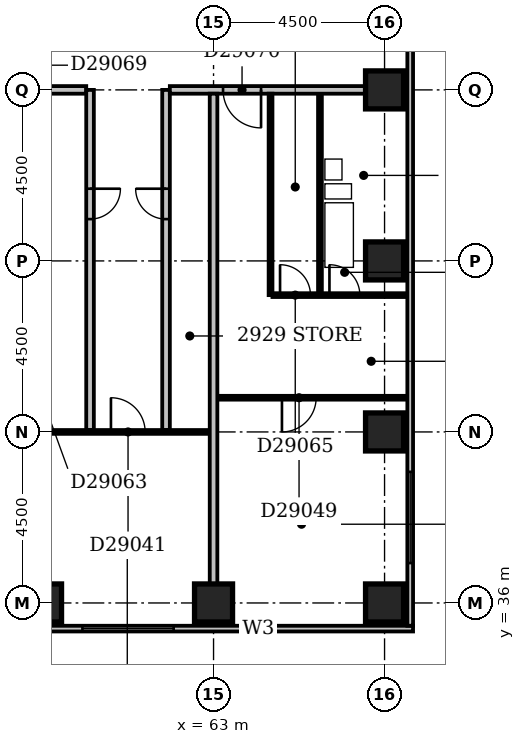
"""IFC4 building model, lengths in metres.
Left out: names, types, materials, properties, quantities, classifications, styles, units other than length and angle.
Written with IfcOpenShell. Run it as: python <this file> out.ifc"""

import sys

from ifc_helpers import new_model, si_unit, direction, frame, frame_2d, origin, origin_2d, place, context, subcontext, project, spatial, rectangle, extrude, element, fill, save


model = new_model("IFC4")
c1 = context("Model", 3, precision=1e-05, world=origin(), true_north=direction((0.0, 1.0)))
c2 = subcontext(c1, "Body", "Model", "MODEL_VIEW")
j1 = project(units=[si_unit("LENGTHUNIT", "METRE"), si_unit("PLANEANGLEUNIT", "RADIAN")], contexts=[c1])
p1 = place(None, origin())
s1 = spatial("IfcSite", under=j1, at=p1, CompositionType="ELEMENT")
p2 = place(p1, origin())
s2 = spatial("IfcBuilding", under=s1, at=p2, CompositionType="ELEMENT")
p3 = place(p2, frame((0.0, 0.0, 119.6)))
s3 = spatial("IfcBuildingStorey", under=s2, at=p3, CompositionType="ELEMENT", Elevation=119.6)
for number, where, z_axis, x_axis in (
    (1, (58.5, 36.0, -0.3), (0.0, 0.0, 1.0), (1.0, 0.0, 0.0)),
    (2, (63.0, 36.0, -0.3), (0.0, 0.0, 1.0), (1.0, 0.0, 0.0)),
    (3, (67.5, 36.0, -0.3), (0.0, 0.0, 1.0), (1.0, 0.0, 0.0)),
    (4, (67.5, 40.5, -0.3), (0.0, 0.0, 1.0), (1.0, 0.0, 0.0)),
    (5, (67.5, 45.0, -0.3), (0.0, 0.0, 1.0), (1.0, 0.0, 0.0)),
    (6, (67.5, 49.5, -0.3), (0.0, 0.0, 1.0), (1.0, 0.0, 0.0)),
):
    element("IfcColumn", number, at=place(p3, frame(where, z_axis=z_axis, x_axis=x_axis)), inside=s3, PredefinedType="COLUMN", context=c2, shape_type="SweptSolid", body=[
        extrude(rectangle(XDim=1.0, YDim=1.0, at=origin_2d()), origin(), (0.0, 0.0, 1.0), 3.6),
    ])
p4 = place(p3, frame((23.1, 35.325, 0.0), z_axis=(0.0, 0.0, 1.0), x_axis=(1.0, 0.0, 0.0)))
e7 = element("IfcWall", 7, at=p4, inside=s3, PredefinedType="STANDARD", context=c2, shape_type="SweptSolid", body=[
    extrude(rectangle(XDim=45.15, YDim=0.15, at=frame_2d((22.575, 0.0))), origin(), (0.0, 0.0, 1.0), 2.7),
])
p5 = place(p4, frame((0.45, 0.0, 0.6)))
e8 = element("IfcOpeningElement", 8, at=p5, cuts=e7, PredefinedType="OPENING", context=c2, shape_type="SweptSolid", body=[
    extrude(rectangle(XDim=2.4, YDim=1.8, at=frame_2d((1.2, 0.9))), frame((0.0, 0.087, 0.0), z_axis=(0.0, -1.0, 0.0), x_axis=(1.0, 0.0, 0.0)), (0.0, 0.0, 1.0), 0.174),
])
p6 = place(p4, frame((4.95, 0.0, 0.6)))
e9 = element("IfcOpeningElement", 9, at=p6, cuts=e7, PredefinedType="OPENING", context=c2, shape_type="SweptSolid", body=[
    extrude(rectangle(XDim=2.4, YDim=1.8, at=frame_2d((1.2, 0.9))), frame((0.0, 0.087, 0.0), z_axis=(0.0, -1.0, 0.0), x_axis=(1.0, 0.0, 0.0)), (0.0, 0.0, 1.0), 0.174),
])
p7 = place(p4, frame((9.225, 0.0, 0.6)))
e10 = element("IfcOpeningElement", 10, at=p7, cuts=e7, PredefinedType="OPENING", context=c2, shape_type="SweptSolid", body=[
    extrude(rectangle(XDim=1.5, YDim=1.8, at=frame_2d((0.75, 0.9))), frame((0.0, 0.087, 0.0), z_axis=(0.0, -1.0, 0.0), x_axis=(1.0, 0.0, 0.0)), (0.0, 0.0, 1.0), 0.174),
])
p8 = place(p4, frame((15.146, 0.0, 0.6)))
e11 = element("IfcOpeningElement", 11, at=p8, cuts=e7, PredefinedType="OPENING", context=c2, shape_type="SweptSolid", body=[
    extrude(rectangle(XDim=1.5, YDim=1.8, at=frame_2d((0.75, 0.9))), frame((0.0, 0.087, 0.0), z_axis=(0.0, -1.0, 0.0), x_axis=(1.0, 0.0, 0.0)), (0.0, 0.0, 1.0), 0.174),
])
p9 = place(p4, frame((18.45, 0.0, 0.6)))
e12 = element("IfcOpeningElement", 12, at=p9, cuts=e7, PredefinedType="OPENING", context=c2, shape_type="SweptSolid", body=[
    extrude(rectangle(XDim=2.4, YDim=1.8, at=frame_2d((1.2, 0.9))), frame((0.0, 0.087, 0.0), z_axis=(0.0, -1.0, 0.0), x_axis=(1.0, 0.0, 0.0)), (0.0, 0.0, 1.0), 0.174),
])
p10 = place(p4, frame((22.95, 0.0, 0.6)))
e13 = element("IfcOpeningElement", 13, at=p10, cuts=e7, PredefinedType="OPENING", context=c2, shape_type="SweptSolid", body=[
    extrude(rectangle(XDim=2.4, YDim=1.8, at=frame_2d((1.2, 0.9))), frame((0.0, 0.087, 0.0), z_axis=(0.0, -1.0, 0.0), x_axis=(1.0, 0.0, 0.0)), (0.0, 0.0, 1.0), 0.174),
])
p11 = place(p4, frame((27.45, 0.0, 0.6)))
e14 = element("IfcOpeningElement", 14, at=p11, cuts=e7, PredefinedType="OPENING", context=c2, shape_type="SweptSolid", body=[
    extrude(rectangle(XDim=2.4, YDim=1.8, at=frame_2d((1.2, 0.9))), frame((0.0, 0.087, 0.0), z_axis=(0.0, -1.0, 0.0), x_axis=(1.0, 0.0, 0.0)), (0.0, 0.0, 1.0), 0.174),
])
p12 = place(p4, frame((31.95, 0.0, 0.6)))
e15 = element("IfcOpeningElement", 15, at=p12, cuts=e7, PredefinedType="OPENING", context=c2, shape_type="SweptSolid", body=[
    extrude(rectangle(XDim=2.4, YDim=1.8, at=frame_2d((1.2, 0.9))), frame((0.0, 0.087, 0.0), z_axis=(0.0, -1.0, 0.0), x_axis=(1.0, 0.0, 0.0)), (0.0, 0.0, 1.0), 0.174),
])
p13 = place(p4, frame((36.45, 0.0, 0.6)))
e16 = element("IfcOpeningElement", 16, at=p13, cuts=e7, PredefinedType="OPENING", context=c2, shape_type="SweptSolid", body=[
    extrude(rectangle(XDim=2.4, YDim=1.8, at=frame_2d((1.2, 0.9))), frame((0.0, 0.087, 0.0), z_axis=(0.0, -1.0, 0.0), x_axis=(1.0, 0.0, 0.0)), (0.0, 0.0, 1.0), 0.174),
])
p14 = place(p4, frame((40.631, 0.0, 0.6)))
e17 = element("IfcOpeningElement", 17, at=p14, cuts=e7, PredefinedType="OPENING", context=c2, shape_type="SweptSolid", body=[
    extrude(rectangle(XDim=0.9, YDim=1.8, at=frame_2d((0.45, 0.9))), frame((0.0, 0.087, 0.0), z_axis=(0.0, -1.0, 0.0), x_axis=(1.0, 0.0, 0.0)), (0.0, 0.0, 1.0), 0.174),
])
p15 = place(p3, frame((68.175, 35.4, 0.0), z_axis=(0.0, 0.0, 1.0), x_axis=(0.0, 1.0, 0.0)))
e18 = element("IfcWall", 18, at=p15, inside=s3, PredefinedType="STANDARD", context=c2, shape_type="SweptSolid", body=[
    extrude(rectangle(XDim=23.85, YDim=0.15, at=frame_2d((11.925, 0.0))), origin(), (0.0, 0.0, 1.0), 2.7),
])
p16 = place(p15, frame((1.65, 0.0, 0.6)))
e19 = element("IfcOpeningElement", 19, at=p16, cuts=e18, PredefinedType="OPENING", context=c2, shape_type="SweptSolid", body=[
    extrude(rectangle(XDim=2.4, YDim=1.8, at=frame_2d((1.2, 0.9))), frame((0.0, 0.087, 0.0), z_axis=(0.0, -1.0, 0.0), x_axis=(1.0, 0.0, 0.0)), (0.0, 0.0, 1.0), 0.174),
])
p17 = place(p15, frame((19.65, 0.0, 0.6)))
e20 = element("IfcOpeningElement", 20, at=p17, cuts=e18, PredefinedType="OPENING", context=c2, shape_type="SweptSolid", body=[
    extrude(rectangle(XDim=2.4, YDim=1.8, at=frame_2d((1.2, 0.9))), frame((0.0, 0.087, 0.0), z_axis=(0.0, -1.0, 0.0), x_axis=(1.0, 0.0, 0.0)), (0.0, 0.0, 1.0), 0.174),
])
p18 = place(p3, frame((63.0, 36.5, 0.0), z_axis=(0.0, 0.0, 1.0), x_axis=(0.0, 1.0, 0.0)))
e21 = element("IfcWall", 21, at=p18, inside=s3, PredefinedType="PARTITIONING", context=c2, shape_type="SweptSolid", body=[
    extrude(rectangle(XDim=12.9, YDim=0.2, at=frame_2d((6.45, 0.0))), origin(), (0.0, 0.0, 1.0), 2.4),
])
p19 = place(p3, frame((58.6, 40.5, 0.0), z_axis=(0.0, 0.0, 1.0), x_axis=(1.0, 0.0, 0.0)))
e22 = element("IfcWall", 22, at=p19, inside=s3, PredefinedType="PARTITIONING", context=c2, shape_type="SweptSolid", body=[
    extrude(rectangle(XDim=4.3, YDim=0.1, at=frame_2d((2.15, 0.0))), origin(), (0.0, 0.0, 1.0), 3.3),
])
p20 = place(p19, frame((1.7, 0.0, 0.0)))
e23 = element("IfcOpeningElement", 23, at=p20, cuts=e22, PredefinedType="OPENING", context=c2, shape_type="SweptSolid", body=[
    extrude(rectangle(XDim=0.9, YDim=2.1, at=frame_2d((0.45, 1.05))), frame((0.0, 0.062, 0.0), z_axis=(0.0, -1.0, 0.0), x_axis=(1.0, 0.0, 0.0)), (0.0, 0.0, 1.0), 0.124),
])
p21 = place(p3, frame((59.75, 40.55, 0.0), z_axis=(0.0, 0.0, 1.0), x_axis=(0.0, 1.0, 0.0)))
e24 = element("IfcWall", 24, at=p21, inside=s3, PredefinedType="PARTITIONING", context=c2, shape_type="SweptSolid", body=[
    extrude(rectangle(XDim=8.95, YDim=0.2, at=frame_2d((4.475, 0.0))), origin(), (0.0, 0.0, 1.0), 3.3),
])
p22 = place(p21, frame((5.55, 0.0, 0.0)))
e25 = element("IfcOpeningElement", 25, at=p22, cuts=e24, PredefinedType="OPENING", context=c2, shape_type="SweptSolid", body=[
    extrude(rectangle(XDim=0.8, YDim=2.1, at=frame_2d((0.4, 1.05))), frame((0.0, 0.112, 0.0), z_axis=(0.0, -1.0, 0.0), x_axis=(1.0, 0.0, 0.0)), (0.0, 0.0, 1.0), 0.224),
])
p23 = place(p3, frame((61.75, 40.55, 0.0), z_axis=(0.0, 0.0, 1.0), x_axis=(0.0, 1.0, 0.0)))
e26 = element("IfcWall", 26, at=p23, inside=s3, PredefinedType="PARTITIONING", context=c2, shape_type="SweptSolid", body=[
    extrude(rectangle(XDim=8.95, YDim=0.2, at=frame_2d((4.475, 0.0))), origin(), (0.0, 0.0, 1.0), 3.3),
])
p24 = place(p23, frame((5.55, 0.0, 0.0)))
e27 = element("IfcOpeningElement", 27, at=p24, cuts=e26, PredefinedType="OPENING", context=c2, shape_type="SweptSolid", body=[
    extrude(rectangle(XDim=0.8, YDim=2.1, at=frame_2d((0.4, 1.05))), frame((0.0, 0.112, 0.0), z_axis=(0.0, -1.0, 0.0), x_axis=(1.0, 0.0, 0.0)), (0.0, 0.0, 1.0), 0.224),
])
p25 = place(p3, frame((63.1, 41.4, 0.0), z_axis=(0.0, 0.0, 1.0), x_axis=(1.0, 0.0, 0.0)))
e28 = element("IfcWall", 28, at=p25, inside=s3, PredefinedType="PARTITIONING", context=c2, shape_type="SweptSolid", body=[
    extrude(rectangle(XDim=5.0, YDim=0.1, at=frame_2d((2.5, 0.0))), origin(), (0.0, 0.0, 1.0), 3.3),
])
p26 = place(p25, frame((1.7, 0.0, 0.0)))
e29 = element("IfcOpeningElement", 29, at=p26, cuts=e28, PredefinedType="OPENING", context=c2, shape_type="SweptSolid", body=[
    extrude(rectangle(XDim=0.9, YDim=2.1, at=frame_2d((0.45, 1.05))), frame((0.0, 0.062, 0.0), z_axis=(0.0, -1.0, 0.0), x_axis=(1.0, 0.0, 0.0)), (0.0, 0.0, 1.0), 0.124),
])
p27 = place(p3, frame((64.5, 44.1, 0.0), z_axis=(0.0, 0.0, 1.0), x_axis=(0.0, 1.0, 0.0)))
e30 = element("IfcWall", 30, at=p27, inside=s3, PredefinedType="PARTITIONING", context=c2, shape_type="SweptSolid", body=[
    extrude(rectangle(XDim=5.3, YDim=0.1, at=frame_2d((2.65, 0.0))), origin(), (0.0, 0.0, 1.0), 3.3),
])
p28 = place(p3, frame((64.55, 44.1, 0.0), z_axis=(0.0, 0.0, 1.0), x_axis=(1.0, 0.0, 0.0)))
e31 = element("IfcWall", 31, at=p28, inside=s3, PredefinedType="PARTITIONING", context=c2, shape_type="SweptSolid", body=[
    extrude(rectangle(XDim=3.55, YDim=0.1, at=frame_2d((1.775, 0.0))), origin(), (0.0, 0.0, 1.0), 3.3),
])
p29 = place(p28, frame((1.5, 0.0, 0.0)))
e32 = element("IfcOpeningElement", 32, at=p29, cuts=e31, PredefinedType="OPENING", context=c2, shape_type="SweptSolid", body=[
    extrude(rectangle(XDim=0.8, YDim=2.1, at=frame_2d((0.4, 1.05))), frame((0.0, 0.062, 0.0), z_axis=(0.0, -1.0, 0.0), x_axis=(1.0, 0.0, 0.0)), (0.0, 0.0, 1.0), 0.124),
])
p30 = place(p28, frame((0.2, 0.0, 0.0)))
e33 = element("IfcOpeningElement", 33, at=p30, cuts=e31, PredefinedType="OPENING", context=c2, shape_type="SweptSolid", body=[
    extrude(rectangle(XDim=0.8, YDim=2.1, at=frame_2d((0.4, 1.05))), frame((0.0, 0.062, 0.0), z_axis=(0.0, -1.0, 0.0), x_axis=(1.0, 0.0, 0.0)), (0.0, 0.0, 1.0), 0.124),
])
p31 = place(p3, frame((65.8, 44.15, 0.0), z_axis=(0.0, 0.0, 1.0), x_axis=(0.0, 1.0, 0.0)))
e34 = element("IfcWall", 34, at=p31, inside=s3, PredefinedType="PLUMBINGWALL", context=c2, shape_type="SweptSolid", body=[
    extrude(rectangle(XDim=5.25, YDim=0.1, at=frame_2d((2.625, 0.0))), origin(), (0.0, 0.0, 1.0), 3.3),
])
p32 = place(p3, frame((52.85, 49.5, 0.0), z_axis=(0.0, 0.0, 1.0), x_axis=(1.0, 0.0, 0.0)))
e35 = element("IfcWall", 35, at=p32, inside=s3, PredefinedType="PARTITIONING", context=c2, shape_type="SweptSolid", body=[
    extrude(rectangle(XDim=6.8, YDim=0.2, at=frame_2d((3.4, 0.0))), origin(), (0.0, 0.0, 1.0), 3.3),
])
p33 = place(p32, frame((3.1, 0.0, 0.0)))
e36 = element("IfcOpeningElement", 36, at=p33, cuts=e35, PredefinedType="OPENING", context=c2, shape_type="SweptSolid", body=[
    extrude(rectangle(XDim=1.0, YDim=2.1, at=frame_2d((0.5, 1.05))), frame((0.0, 0.112, 0.0), z_axis=(0.0, -1.0, 0.0), x_axis=(1.0, 0.0, 0.0)), (0.0, 0.0, 1.0), 0.224),
])
p34 = place(p3, frame((61.85, 49.5, 0.0), z_axis=(0.0, 0.0, 1.0), x_axis=(1.0, 0.0, 0.0)))
e37 = element("IfcWall", 37, at=p34, inside=s3, PredefinedType="PARTITIONING", context=c2, shape_type="SweptSolid", body=[
    extrude(rectangle(XDim=5.15, YDim=0.2, at=frame_2d((2.575, 0.0))), origin(), (0.0, 0.0, 1.0), 3.3),
])
p35 = place(p34, frame((1.4, 0.0, 0.0)))
e38 = element("IfcOpeningElement", 38, at=p35, cuts=e37, PredefinedType="OPENING", context=c2, shape_type="SweptSolid", body=[
    extrude(rectangle(XDim=1.0, YDim=2.1, at=frame_2d((0.5, 1.05))), frame((0.0, 0.112, 0.0), z_axis=(0.0, -1.0, 0.0), x_axis=(1.0, 0.0, 0.0)), (0.0, 0.0, 1.0), 0.224),
])
p36 = place(p13, origin())
e39 = element("IfcWindow", 39, at=p36, inside=s3, PartitioningType="SINGLE_PANEL", PredefinedType="WINDOW", context=c2, shape_type="SweptSolid", body=[
    extrude(rectangle(XDim=2.4, YDim=1.8, at=frame_2d((1.2, 0.9))), frame((0.0, 0.03, 0.0), z_axis=(0.0, -1.0, 0.0), x_axis=(1.0, 0.0, 0.0)), (0.0, 0.0, 1.0), 0.06),
])
fill(e16, e39)
p37 = place(p14, origin())
e40 = element("IfcWindow", 40, at=p37, inside=s3, PartitioningType="SINGLE_PANEL", PredefinedType="WINDOW", context=c2, shape_type="SweptSolid", body=[
    extrude(rectangle(XDim=0.9, YDim=1.8, at=frame_2d((0.45, 0.9))), frame((0.0, 0.03, 0.0), z_axis=(0.0, -1.0, 0.0), x_axis=(1.0, 0.0, 0.0)), (0.0, 0.0, 1.0), 0.06),
])
fill(e17, e40)
p38 = place(p16, origin())
e41 = element("IfcWindow", 41, at=p38, inside=s3, PartitioningType="SINGLE_PANEL", PredefinedType="WINDOW", context=c2, shape_type="SweptSolid", body=[
    extrude(rectangle(XDim=2.4, YDim=1.8, at=frame_2d((1.2, 0.9))), frame((0.0, 0.03, 0.0), z_axis=(0.0, -1.0, 0.0), x_axis=(1.0, 0.0, 0.0)), (0.0, 0.0, 1.0), 0.06),
])
fill(e19, e41)
p39 = place(p20, origin())
e42 = element("IfcDoor", 42, at=p39, inside=s3, OperationType="SINGLE_SWING_LEFT", PredefinedType="DOOR", context=c2, shape_type="SweptSolid", body=[
    extrude(rectangle(XDim=0.9, YDim=2.1, at=frame_2d((0.45, 1.05))), frame((0.0, 0.025, 0.0), z_axis=(0.0, -1.0, 0.0), x_axis=(1.0, 0.0, 0.0)), (0.0, 0.0, 1.0), 0.05),
])
fill(e23, e42)
p40 = place(p22, origin())
e43 = element("IfcDoor", 43, at=p40, inside=s3, OperationType="SINGLE_SWING_RIGHT", PredefinedType="DOOR", context=c2, shape_type="SweptSolid", body=[
    extrude(rectangle(XDim=0.8, YDim=2.1, at=frame_2d((0.4, 1.05))), frame((0.0, 0.025, 0.0), z_axis=(0.0, -1.0, 0.0), x_axis=(1.0, 0.0, 0.0)), (0.0, 0.0, 1.0), 0.05),
])
fill(e25, e43)
p41 = place(p24, frame((0.8, 0.0, 0.0), z_axis=(0.0, 0.0, 1.0), x_axis=(-1.0, 0.0, 0.0)))
e44 = element("IfcDoor", 44, at=p41, inside=s3, OperationType="SINGLE_SWING_LEFT", PredefinedType="DOOR", context=c2, shape_type="SweptSolid", body=[
    extrude(rectangle(XDim=0.8, YDim=2.1, at=frame_2d((0.4, 1.05))), frame((0.0, 0.025, 0.0), z_axis=(0.0, -1.0, 0.0), x_axis=(1.0, 0.0, 0.0)), (0.0, 0.0, 1.0), 0.05),
])
fill(e27, e44)
p42 = place(p26, frame((0.9, 0.0, 0.0), z_axis=(0.0, 0.0, 1.0), x_axis=(-1.0, 0.0, 0.0)))
e45 = element("IfcDoor", 45, at=p42, inside=s3, OperationType="SINGLE_SWING_RIGHT", PredefinedType="DOOR", context=c2, shape_type="SweptSolid", body=[
    extrude(rectangle(XDim=0.9, YDim=2.1, at=frame_2d((0.45, 1.05))), frame((0.0, 0.025, 0.0), z_axis=(0.0, -1.0, 0.0), x_axis=(1.0, 0.0, 0.0)), (0.0, 0.0, 1.0), 0.05),
])
fill(e29, e45)
p43 = place(p29, origin())
e46 = element("IfcDoor", 46, at=p43, inside=s3, OperationType="SINGLE_SWING_LEFT", PredefinedType="DOOR", context=c2, shape_type="SweptSolid", body=[
    extrude(rectangle(XDim=0.8, YDim=2.1, at=frame_2d((0.4, 1.05))), frame((0.0, 0.025, 0.0), z_axis=(0.0, -1.0, 0.0), x_axis=(1.0, 0.0, 0.0)), (0.0, 0.0, 1.0), 0.05),
])
fill(e32, e46)
p44 = place(p30, origin())
e47 = element("IfcDoor", 47, at=p44, inside=s3, OperationType="SINGLE_SWING_LEFT", PredefinedType="DOOR", context=c2, shape_type="SweptSolid", body=[
    extrude(rectangle(XDim=0.8, YDim=2.1, at=frame_2d((0.4, 1.05))), frame((0.0, 0.025, 0.0), z_axis=(0.0, -1.0, 0.0), x_axis=(1.0, 0.0, 0.0)), (0.0, 0.0, 1.0), 0.05),
])
fill(e33, e47)
p45 = place(p35, origin())
e48 = element("IfcDoor", 48, at=p45, inside=s3, OperationType="SINGLE_SWING_RIGHT", PredefinedType="DOOR", context=c2, shape_type="SweptSolid", body=[
    extrude(rectangle(XDim=1.0, YDim=2.1, at=frame_2d((0.5, 1.05))), frame((0.0, 0.025, 0.0), z_axis=(0.0, -1.0, 0.0), x_axis=(1.0, 0.0, 0.0)), (0.0, 0.0, 1.0), 0.05),
])
fill(e38, e48)
save(model, sys.argv[1])
